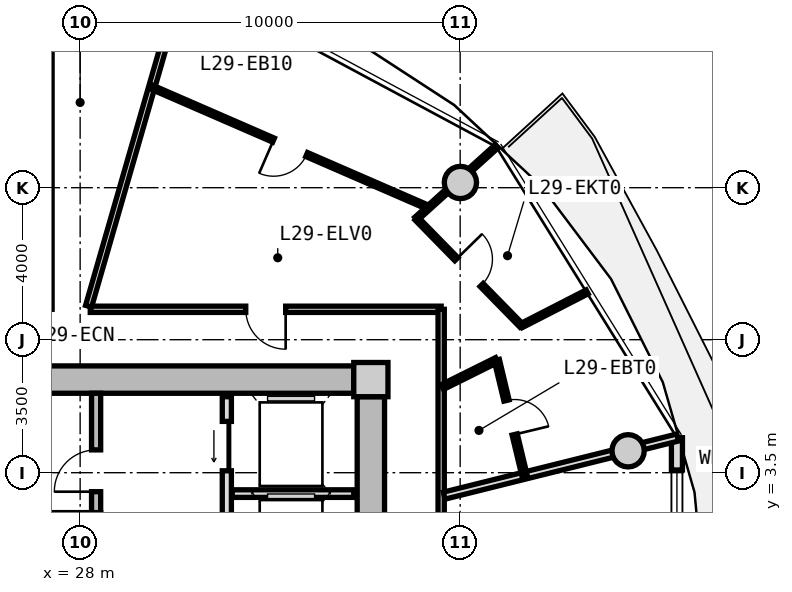
"""IFC4 building model, lengths in metres.
Left out: names, types, materials, properties, quantities, classifications, styles, units other than length and angle.
Written with IfcOpenShell. Run it as: python <this file> out.ifc"""

import sys

from ifc_helpers import new_model, si_unit, direction, frame, frame_2d, origin, origin_2d, place, context, subcontext, project, spatial, rectangle, circle, extrude, source, transform, mapped, element, fill, save


model = new_model("IFC4")
c1 = context("Model", 3, precision=1e-05, world=origin(), true_north=direction((0.0, 1.0)))
c2 = subcontext(c1, "Body", "Model", "MODEL_VIEW")
j1 = project(units=[si_unit("LENGTHUNIT", "METRE"), si_unit("PLANEANGLEUNIT", "RADIAN")], contexts=[c1])
p1 = place(None, origin())
s1 = spatial("IfcSite", under=j1, at=p1, CompositionType="ELEMENT")
p2 = place(p1, origin())
s2 = spatial("IfcBuilding", under=s1, at=p2, CompositionType="ELEMENT")
p3 = place(p2, frame((0.0, 0.0, 96.25)))
s3 = spatial("IfcBuildingStorey", under=s2, at=p3, CompositionType="ELEMENT", Elevation=96.25)
m1 = source(origin(), c2, "Body", "SweptSolid", [
    extrude(rectangle(XDim=0.9, YDim=0.9, at=origin_2d()), origin(), (0.0, 0.0, 1.0), 3.05),
])
p4 = place(p3, frame((35.65, 5.95, 0.0), z_axis=(0.0, 0.0, 1.0), x_axis=(1.0, 0.0, 0.0)))
e1 = element("IfcColumn", 1, at=p4, inside=s3, PredefinedType="COLUMN", context=c2, shape_type="MappedRepresentation", body=[
    mapped(m1, transform((0.0, 0.0, 0.0), x_axis=(1.0, 0.0, 0.0), y_axis=(0.0, 1.0, 0.0), z_axis=(0.0, 0.0, 1.0), scale=1.0)),
])
m2 = source(origin(), c2, "Body", "SweptSolid", [
    extrude(rectangle(XDim=14.4, YDim=0.72, at=frame_2d((7.2, 0.0))), origin(), (0.0, 0.0, 1.0), 2.79),
])
p5 = place(p3, frame((20.8, 5.95, 0.0), z_axis=(0.0, 0.0, 1.0), x_axis=(1.0, 0.0, 0.0)))
e2 = element("IfcWall", 2, at=p5, inside=s3, PredefinedType="SHEAR", context=c2, shape_type="MappedRepresentation", body=[
    mapped(m2, transform((0.0, 0.0, 0.0), x_axis=(1.0, 0.0, 0.0), y_axis=(0.0, 1.0, 0.0), z_axis=(0.0, 0.0, 1.0), scale=1.0)),
])
m3 = source(origin(), c2, "Body", "SweptSolid", [
    extrude(rectangle(XDim=11.0, YDim=0.72, at=frame_2d((5.5, 0.0))), origin(), (0.0, 0.0, 1.0), 2.79),
])
p6 = place(p3, frame((35.65, 5.5, 0.0), z_axis=(0.0, 0.0, 1.0), x_axis=(0.0, -1.0, 0.0)))
e3 = element("IfcWall", 3, at=p6, inside=s3, PredefinedType="SHEAR", context=c2, shape_type="MappedRepresentation", body=[
    mapped(m3, transform((0.0, 0.0, 0.0), x_axis=(1.0, 0.0, 0.0), y_axis=(0.0, 1.0, 0.0), z_axis=(0.0, 0.0, 1.0), scale=1.0)),
])
p7 = place(p6, frame((5.65, 0.0, 0.0)))
e4 = element("IfcOpeningElement", 4, at=p7, cuts=e3, PredefinedType="OPENING", context=c2, shape_type="SweptSolid", body=[
    extrude(rectangle(XDim=1.2, YDim=2.15, at=frame_2d((0.6, 1.075))), frame((0.0, 0.37, 0.0), z_axis=(0.0, -1.0, 0.0), x_axis=(1.0, 0.0, 0.0)), (0.0, 0.0, 1.0), 0.74),
])
p8 = place(p6, frame((9.3, 0.0, 0.0)))
e5 = element("IfcOpeningElement", 5, at=p8, cuts=e3, PredefinedType="OPENING", context=c2, shape_type="SweptSolid", body=[
    extrude(rectangle(XDim=1.0, YDim=2.1, at=frame_2d((0.5, 1.05))), frame((0.0, 0.37, 0.0), z_axis=(0.0, -1.0, 0.0), x_axis=(1.0, 0.0, 0.0)), (0.0, 0.0, 1.0), 0.74),
])
m4 = source(origin(), c2, "Body", "SweptSolid", [
    extrude(circle(Radius=0.425, at=origin_2d()), origin(), (0.0, 0.0, 1.0), 3.05),
])
for number, where, z_axis, x_axis in (
    (6, (42.419, 4.076, 0.0), (0.0, 0.0, 1.0), (1.0, 0.0, 0.0)),
    (7, (38.006, 11.137, 0.0), (0.0, 0.0, 1.0), (1.0, 0.0, 0.0)),
):
    element("IfcColumn", number, at=place(p3, frame(where, z_axis=z_axis, x_axis=x_axis)), inside=s3, PredefinedType="COLUMN", context=c2, shape_type="MappedRepresentation", body=[
        mapped(m4, transform((0.0, 0.0, 0.0), x_axis=(1.0, 0.0, 0.0), y_axis=(0.0, 1.0, 0.0), z_axis=(0.0, 0.0, 1.0), scale=1.0)),
    ])
m5 = source(origin(), c2, "Body", "SweptSolid", [
    extrude(rectangle(XDim=8.841, YDim=0.29, at=frame_2d((4.421, 0.0))), origin(), (0.0, 0.0, 1.0), 2.79),
])
p9 = place(p3, frame((43.704, 4.421, 0.0), z_axis=(0.0, 0.0, 1.0), x_axis=(0.0, -1.0, 0.0)))
e8 = element("IfcWall", 8, at=p9, inside=s3, PredefinedType="SOLIDWALL", context=c2, shape_type="MappedRepresentation", body=[
    mapped(m5, transform((0.0, 0.0, 0.0), x_axis=(1.0, 0.0, 0.0), y_axis=(0.0, 1.0, 0.0), z_axis=(0.0, 0.0, 1.0), scale=1.0)),
])
p10 = place(p9, frame((6.74, 0.0, 0.0)))
e9 = element("IfcOpeningElement", 9, at=p10, cuts=e8, PredefinedType="OPENING", context=c2, shape_type="SweptSolid", body=[
    extrude(rectangle(XDim=1.15, YDim=2.25, at=frame_2d((0.575, 1.125))), frame((0.0, 0.155, 0.0), z_axis=(0.0, -1.0, 0.0), x_axis=(1.0, 0.0, 0.0)), (0.0, 0.0, 1.0), 0.31),
])
p11 = place(p9, frame((0.85, 0.0, 0.85)))
e10 = element("IfcOpeningElement", 10, at=p11, cuts=e8, PredefinedType="OPENING", context=c2, shape_type="SweptSolid", body=[
    extrude(rectangle(XDim=1.2, YDim=1.5, at=frame_2d((0.6, 0.75))), frame((0.0, 0.155, 0.0), z_axis=(0.0, -1.0, 0.0), x_axis=(1.0, 0.0, 0.0)), (0.0, 0.0, 1.0), 0.31),
])
m6 = source(origin(), c2, "Body", "SweptSolid", [
    extrude(rectangle(XDim=3.14, YDim=0.24, at=frame_2d((1.57, 0.0))), origin(), (0.0, 0.0, 1.0), 2.79),
])
p12 = place(p3, frame((28.42, 2.45, 0.0), z_axis=(0.0, 0.0, 1.0), x_axis=(0.0, 1.0, 0.0)))
e11 = element("IfcWall", 11, at=p12, inside=s3, PredefinedType="PARTITIONING", context=c2, shape_type="MappedRepresentation", body=[
    mapped(m6, transform((0.0, 0.0, 0.0), x_axis=(1.0, 0.0, 0.0), y_axis=(0.0, 1.0, 0.0), z_axis=(0.0, 0.0, 1.0), scale=1.0)),
])
p13 = place(p12, frame((0.55, 0.0, 0.0)))
e12 = element("IfcOpeningElement", 12, at=p13, cuts=e11, PredefinedType="OPENING", context=c2, shape_type="SweptSolid", body=[
    extrude(rectangle(XDim=1.1, YDim=2.15, at=frame_2d((0.55, 1.075))), frame((0.0, 0.13, 0.0), z_axis=(0.0, -1.0, 0.0), x_axis=(1.0, 0.0, 0.0)), (0.0, 0.0, 1.0), 0.26),
])
m7 = source(origin(), c2, "Body", "SweptSolid", [
    extrude(rectangle(XDim=5.0, YDim=0.24, at=frame_2d((2.5, 0.0))), origin(), (0.0, 0.0, 1.0), 2.775),
])
p14 = place(p3, frame((31.86, 0.5, 0.0), z_axis=(0.0, 0.0, 1.0), x_axis=(0.0, 1.0, 0.0)))
e13 = element("IfcWall", 13, at=p14, inside=s3, PredefinedType="PARTITIONING", context=c2, shape_type="MappedRepresentation", body=[
    mapped(m7, transform((0.0, 0.0, 0.0), x_axis=(1.0, 0.0, 0.0), y_axis=(0.0, 1.0, 0.0), z_axis=(0.0, 0.0, 1.0), scale=1.0)),
])
p15 = place(p14, frame((3.05, 0.0, 0.0)))
e14 = element("IfcOpeningElement", 14, at=p15, cuts=e13, PredefinedType="OPENING", context=c2, shape_type="SweptSolid", body=[
    extrude(rectangle(XDim=1.3, YDim=2.2, at=frame_2d((0.65, 1.1))), frame((0.0, 0.13, 0.0), z_axis=(0.0, -1.0, 0.0), x_axis=(1.0, 0.0, 0.0)), (0.0, 0.0, 1.0), 0.26),
])
p16 = place(p14, frame((0.55, 0.0, 0.0)))
e15 = element("IfcOpeningElement", 15, at=p16, cuts=e13, PredefinedType="OPENING", context=c2, shape_type="SweptSolid", body=[
    extrude(rectangle(XDim=1.3, YDim=2.2, at=frame_2d((0.65, 1.1))), frame((0.0, 0.13, 0.0), z_axis=(0.0, -1.0, 0.0), x_axis=(1.0, 0.0, 0.0)), (0.0, 0.0, 1.0), 0.26),
])
m8 = source(origin(), c2, "Body", "SweptSolid", [
    extrude(rectangle(XDim=3.2, YDim=0.2, at=frame_2d((1.6, 0.0))), origin(), (0.0, 0.0, 1.0), 2.775),
])
p17 = place(p3, frame((32.0, 2.95, 0.0), z_axis=(0.0, 0.0, 1.0), x_axis=(1.0, 0.0, 0.0)))
e16 = element("IfcWall", 16, at=p17, inside=s3, PredefinedType="PARTITIONING", context=c2, shape_type="MappedRepresentation", body=[
    mapped(m8, transform((0.0, 0.0, 0.0), x_axis=(1.0, 0.0, 0.0), y_axis=(0.0, 1.0, 0.0), z_axis=(0.0, 0.0, 1.0), scale=1.0)),
])
m9 = source(origin(), c2, "Body", "SweptSolid", [
    extrude(rectangle(XDim=9.234, YDim=0.165, at=frame_2d((4.617, 0.0))), origin(), (0.0, 0.0, 1.0), 2.775),
])
p18 = place(p3, frame((28.266, 7.8, 0.0), z_axis=(0.0, 0.0, 1.0), x_axis=(1.0, 0.0, 0.0)))
e17 = element("IfcWall", 17, at=p18, inside=s3, PredefinedType="PARTITIONING", context=c2, shape_type="MappedRepresentation", body=[
    mapped(m9, transform((0.0, 0.0, 0.0), x_axis=(1.0, 0.0, 0.0), y_axis=(0.0, 1.0, 0.0), z_axis=(0.0, 0.0, 1.0), scale=1.0)),
])
p19 = place(p18, frame((4.092, 0.0, 0.0)))
e18 = element("IfcOpeningElement", 18, at=p19, cuts=e17, PredefinedType="OPENING", context=c2, shape_type="SweptSolid", body=[
    extrude(rectangle(XDim=1.05, YDim=2.15, at=frame_2d((0.525, 1.075))), frame((0.0, 0.093, 0.0), z_axis=(0.0, -1.0, 0.0), x_axis=(1.0, 0.0, 0.0)), (0.0, 0.0, 1.0), 0.185),
])
m10 = source(origin(), c2, "Body", "SweptSolid", [
    extrude(rectangle(XDim=15.6, YDim=0.165, at=frame_2d((7.8, 0.0))), origin(), (0.0, 0.0, 1.0), 2.775),
])
p20 = place(p3, frame((37.5, 7.8, 0.0), z_axis=(0.0, 0.0, 1.0), x_axis=(0.0, -1.0, 0.0)))
e19 = element("IfcWall", 19, at=p20, inside=s3, PredefinedType="PARTITIONING", context=c2, shape_type="MappedRepresentation", body=[
    mapped(m10, transform((0.0, 0.0, 0.0), x_axis=(1.0, 0.0, 0.0), y_axis=(0.0, 1.0, 0.0), z_axis=(0.0, 0.0, 1.0), scale=1.0)),
])
p21 = place(p20, frame((9.482, 0.0, 0.0)))
e20 = element("IfcOpeningElement", 20, at=p21, cuts=e19, PredefinedType="OPENING", context=c2, shape_type="SweptSolid", body=[
    extrude(rectangle(XDim=1.25, YDim=2.2, at=frame_2d((0.625, 1.1))), frame((0.0, 0.093, 0.0), z_axis=(0.0, -1.0, 0.0), x_axis=(1.0, 0.0, 0.0)), (0.0, 0.0, 1.0), 0.185),
])
m11 = source(origin(), c2, "Body", "SweptSolid", [
    extrude(rectangle(XDim=8.989, YDim=0.165, at=frame_2d((4.495, 0.0))), origin(), (0.0, 0.0, 1.0), 2.275),
])
p22 = place(p3, frame((28.222, 7.88, 0.0), z_axis=(0.0, 0.0, 1.0), x_axis=(0.27702323008, 0.960863221274, 0.0)))
e21 = element("IfcWall", 21, at=p22, inside=s3, PredefinedType="PARTITIONING", context=c2, shape_type="MappedRepresentation", body=[
    mapped(m11, transform((0.0, 0.0, 0.0), x_axis=(1.0, 0.0, 0.0), y_axis=(0.0, 1.0, 0.0), z_axis=(0.0, 0.0, 1.0), scale=1.0)),
])
m12 = source(origin(), c2, "Body", "SweptSolid", [
    extrude(rectangle(XDim=6.331, YDim=0.19, at=frame_2d((3.165, 0.0))), origin(), (0.0, 0.0, 1.0), 2.275),
])
p23 = place(p3, frame((37.58, 2.896, 0.0), z_axis=(0.0, 0.0, 1.0), x_axis=(0.97036440661, 0.241646267062, 0.0)))
e22 = element("IfcWall", 22, at=p23, inside=s3, PredefinedType="PARTITIONING", context=c2, shape_type="MappedRepresentation", body=[
    mapped(m12, transform((0.0, 0.0, 0.0), x_axis=(1.0, 0.0, 0.0), y_axis=(0.0, 1.0, 0.0), z_axis=(0.0, 0.0, 1.0), scale=1.0)),
])
m13 = source(origin(), c2, "Body", "SweptSolid", [
    extrude(rectangle(XDim=7.938, YDim=0.115, at=frame_2d((3.969, 0.0))), origin(), (0.0, 0.0, 1.0), 2.775),
])
p24 = place(p3, frame((37.164, 10.479, 0.0), z_axis=(0.0, 0.0, 1.0), x_axis=(-0.917052940979, 0.398765474235, 0.0)))
e23 = element("IfcWall", 23, at=p24, inside=s3, PredefinedType="PARTITIONING", context=c2, shape_type="MappedRepresentation", body=[
    mapped(m13, transform((0.0, 0.0, 0.0), x_axis=(1.0, 0.0, 0.0), y_axis=(0.0, 1.0, 0.0), z_axis=(0.0, 0.0, 1.0), scale=1.0)),
])
p25 = place(p24, frame((3.494, 0.0, 0.0)))
e24 = element("IfcOpeningElement", 24, at=p25, cuts=e23, PredefinedType="OPENING", context=c2, shape_type="SweptSolid", body=[
    extrude(rectangle(XDim=0.95, YDim=2.1, at=frame_2d((0.475, 1.05))), frame((0.0, 0.067, 0.0), z_axis=(0.0, -1.0, 0.0), x_axis=(1.0, 0.0, 0.0)), (0.0, 0.0, 1.0), 0.135),
])
m14 = source(origin(), c2, "Body", "SweptSolid", [
    extrude(rectangle(XDim=2.852, YDim=0.115, at=frame_2d((1.426, 0.0))), origin(), (0.0, 0.0, 1.0), 2.275),
])
p26 = place(p3, frame((36.844, 10.18, 0.0), z_axis=(0.0, 0.0, 1.0), x_axis=(0.742190556634, 0.670188911908, 0.0)))
e25 = element("IfcWall", 25, at=p26, inside=s3, PredefinedType="PARTITIONING", context=c2, shape_type="MappedRepresentation", body=[
    mapped(m14, transform((0.0, 0.0, 0.0), x_axis=(1.0, 0.0, 0.0), y_axis=(0.0, 1.0, 0.0), z_axis=(0.0, 0.0, 1.0), scale=1.0)),
])
m15 = source(origin(), c2, "Body", "SweptSolid", [
    extrude(rectangle(XDim=1.6, YDim=0.14, at=frame_2d((0.8, 0.0))), origin(), (0.0, 0.0, 1.0), 2.775),
])
p27 = place(p3, frame((37.53, 5.754, 0.0), z_axis=(0.0, 0.0, 1.0), x_axis=(0.895522919837, 0.445015393044, 0.0)))
e26 = element("IfcWall", 26, at=p27, inside=s3, PredefinedType="PARTITIONING", context=c2, shape_type="MappedRepresentation", body=[
    mapped(m15, transform((0.0, 0.0, 0.0), x_axis=(1.0, 0.0, 0.0), y_axis=(0.0, 1.0, 0.0), z_axis=(0.0, 0.0, 1.0), scale=1.0)),
])
m16 = source(origin(), c2, "Body", "SweptSolid", [
    extrude(rectangle(XDim=3.112, YDim=0.14, at=frame_2d((1.556, 0.0))), origin(), (0.0, 0.0, 1.0), 2.415),
])
p28 = place(p3, frame((38.963, 6.466, 0.0), z_axis=(0.0, 0.0, 1.0), x_axis=(0.233737944029, -0.972299631555, 0.0)))
e27 = element("IfcWall", 27, at=p28, inside=s3, PredefinedType="PARTITIONING", context=c2, shape_type="MappedRepresentation", body=[
    mapped(m16, transform((0.0, 0.0, 0.0), x_axis=(1.0, 0.0, 0.0), y_axis=(0.0, 1.0, 0.0), z_axis=(0.0, 0.0, 1.0), scale=1.0)),
])
p29 = place(p28, frame((1.096, 0.0, 0.0)))
e28 = element("IfcOpeningElement", 28, at=p29, cuts=e27, PredefinedType="OPENING", context=c2, shape_type="SweptSolid", body=[
    extrude(rectangle(XDim=0.92, YDim=2.1, at=frame_2d((0.46, 1.05))), frame((0.0, 0.08, 0.0), z_axis=(0.0, -1.0, 0.0), x_axis=(1.0, 0.0, 0.0)), (0.0, 0.0, 1.0), 0.16),
])
m17 = source(origin(), c2, "Body", "SweptSolid", [
    extrude(rectangle(XDim=1.945, YDim=0.115, at=frame_2d((0.973, 0.0))), origin(), (0.0, 0.0, 1.0), 2.775),
])
p30 = place(p3, frame((39.611, 7.37, 0.0), z_axis=(0.0, 0.0, 1.0), x_axis=(0.889684148329, 0.456576517368, 0.0)))
e29 = element("IfcWall", 29, at=p30, inside=s3, PredefinedType="PARTITIONING", context=c2, shape_type="MappedRepresentation", body=[
    mapped(m17, transform((0.0, 0.0, 0.0), x_axis=(1.0, 0.0, 0.0), y_axis=(0.0, 1.0, 0.0), z_axis=(0.0, 0.0, 1.0), scale=1.0)),
])
m18 = source(origin(), c2, "Body", "SweptSolid", [
    extrude(rectangle(XDim=3.943, YDim=0.115, at=frame_2d((1.972, 0.0))), origin(), (0.0, 0.0, 1.0), 2.775),
])
p31 = place(p3, frame((39.611, 7.37, 0.0), z_axis=(0.0, 0.0, 1.0), x_axis=(-0.699481885754, 0.714650328134, 0.0)))
e30 = element("IfcWall", 30, at=p31, inside=s3, PredefinedType="PARTITIONING", context=c2, shape_type="MappedRepresentation", body=[
    mapped(m18, transform((0.0, 0.0, 0.0), x_axis=(1.0, 0.0, 0.0), y_axis=(0.0, 1.0, 0.0), z_axis=(0.0, 0.0, 1.0), scale=1.0)),
])
p32 = place(p31, frame((1.497, 0.0, 0.0)))
e31 = element("IfcOpeningElement", 31, at=p32, cuts=e30, PredefinedType="OPENING", context=c2, shape_type="SweptSolid", body=[
    extrude(rectangle(XDim=0.95, YDim=2.1, at=frame_2d((0.475, 1.05))), frame((0.0, 0.067, 0.0), z_axis=(0.0, -1.0, 0.0), x_axis=(1.0, 0.0, 0.0)), (0.0, 0.0, 1.0), 0.135),
])
m19 = source(origin(), c2, "Body", "SweptSolid", [
    extrude(rectangle(XDim=1.2, YDim=1.5, at=frame_2d((0.6, 0.75))), frame((0.0, 0.03, 0.0), z_axis=(0.0, -1.0, 0.0), x_axis=(1.0, 0.0, 0.0)), (0.0, 0.0, 1.0), 0.06),
])
p33 = place(p11, origin())
e32 = element("IfcWindow", 32, at=p33, inside=s3, PartitioningType="SINGLE_PANEL", PredefinedType="WINDOW", context=c2, shape_type="MappedRepresentation", body=[
    mapped(m19, transform((0.0, 0.0, 0.0), x_axis=(1.0, 0.0, 0.0), y_axis=(0.0, 1.0, 0.0), z_axis=(0.0, 0.0, 1.0), scale=1.0)),
])
fill(e10, e32)
m20 = source(origin(), c2, "Body", "SweptSolid", [
    extrude(rectangle(XDim=1.1, YDim=2.15, at=frame_2d((0.55, 1.075))), frame((0.0, 0.025, 0.0), z_axis=(0.0, -1.0, 0.0), x_axis=(1.0, 0.0, 0.0)), (0.0, 0.0, 1.0), 0.05),
])
p34 = place(p13, origin())
e33 = element("IfcDoor", 33, at=p34, inside=s3, OperationType="SINGLE_SWING_LEFT", PredefinedType="DOOR", context=c2, shape_type="MappedRepresentation", body=[
    mapped(m20, transform((0.0, 0.0, 0.0), x_axis=(1.0, 0.0, 0.0), y_axis=(0.0, 1.0, 0.0), z_axis=(0.0, 0.0, 1.0), scale=1.0)),
])
fill(e12, e33)
m21 = source(origin(), c2, "Body", "SweptSolid", [
    extrude(rectangle(XDim=1.3, YDim=2.2, at=frame_2d((0.65, 1.1))), frame((0.0, 0.025, 0.0), z_axis=(0.0, -1.0, 0.0), x_axis=(1.0, 0.0, 0.0)), (0.0, 0.0, 1.0), 0.05),
])
p35 = place(p15, origin())
e34 = element("IfcDoor", 34, at=p35, inside=s3, OperationType="SLIDING_TO_LEFT", PredefinedType="DOOR", context=c2, shape_type="MappedRepresentation", body=[
    mapped(m21, transform((0.0, 0.0, 0.0), x_axis=(1.0, 0.0, 0.0), y_axis=(0.0, 1.0, 0.0), z_axis=(0.0, 0.0, 1.0), scale=1.0)),
])
fill(e14, e34)
m22 = source(origin(), c2, "Body", "SweptSolid", [
    extrude(rectangle(XDim=1.05, YDim=2.15, at=frame_2d((0.525, 1.075))), frame((0.0, 0.025, 0.0), z_axis=(0.0, -1.0, 0.0), x_axis=(1.0, 0.0, 0.0)), (0.0, 0.0, 1.0), 0.05),
])
p36 = place(p19, frame((1.05, 0.0, 0.0), z_axis=(0.0, 0.0, 1.0), x_axis=(-1.0, 0.0, 0.0)))
e35 = element("IfcDoor", 35, at=p36, inside=s3, OperationType="SINGLE_SWING_LEFT", PredefinedType="DOOR", context=c2, shape_type="MappedRepresentation", body=[
    mapped(m22, transform((0.0, 0.0, 0.0), x_axis=(1.0, 0.0, 0.0), y_axis=(0.0, 1.0, 0.0), z_axis=(0.0, 0.0, 1.0), scale=1.0)),
])
fill(e18, e35)
m23 = source(origin(), c2, "Body", "SweptSolid", [
    extrude(rectangle(XDim=0.92, YDim=2.1, at=frame_2d((0.46, 1.05))), frame((0.0, 0.025, 0.0), z_axis=(0.0, -1.0, 0.0), x_axis=(1.0, 0.0, 0.0)), (0.0, 0.0, 1.0), 0.05),
])
p37 = place(p29, origin())
e36 = element("IfcDoor", 36, at=p37, inside=s3, OperationType="SINGLE_SWING_RIGHT", PredefinedType="DOOR", context=c2, shape_type="MappedRepresentation", body=[
    mapped(m23, transform((0.0, 0.0, 0.0), x_axis=(1.0, 0.0, 0.0), y_axis=(0.0, 1.0, 0.0), z_axis=(0.0, 0.0, 1.0), scale=1.0)),
])
fill(e28, e36)
m24 = source(origin(), c2, "Body", "SweptSolid", [
    extrude(rectangle(XDim=0.95, YDim=2.1, at=frame_2d((0.475, 1.05))), frame((0.0, 0.025, 0.0), z_axis=(0.0, -1.0, 0.0), x_axis=(1.0, 0.0, 0.0)), (0.0, 0.0, 1.0), 0.05),
])
p38 = place(p32, frame((0.95, 0.0, 0.0), z_axis=(0.0, 0.0, 1.0), x_axis=(-1.0, 0.0, 0.0)))
e37 = element("IfcDoor", 37, at=p38, inside=s3, OperationType="SINGLE_SWING_LEFT", PredefinedType="DOOR", context=c2, shape_type="MappedRepresentation", body=[
    mapped(m24, transform((0.0, 0.0, 0.0), x_axis=(1.0, 0.0, 0.0), y_axis=(0.0, 1.0, 0.0), z_axis=(0.0, 0.0, 1.0), scale=1.0)),
])
fill(e31, e37)
p39 = place(p25, origin())
e38 = element("IfcDoor", 38, at=p39, inside=s3, OperationType="SINGLE_SWING_RIGHT", PredefinedType="DOOR", context=c2, shape_type="MappedRepresentation", body=[
    mapped(m24, transform((0.0, 0.0, 0.0), x_axis=(1.0, 0.0, 0.0), y_axis=(0.0, 1.0, 0.0), z_axis=(0.0, 0.0, 1.0), scale=1.0)),
])
fill(e24, e38)
save(model, sys.argv[1])
